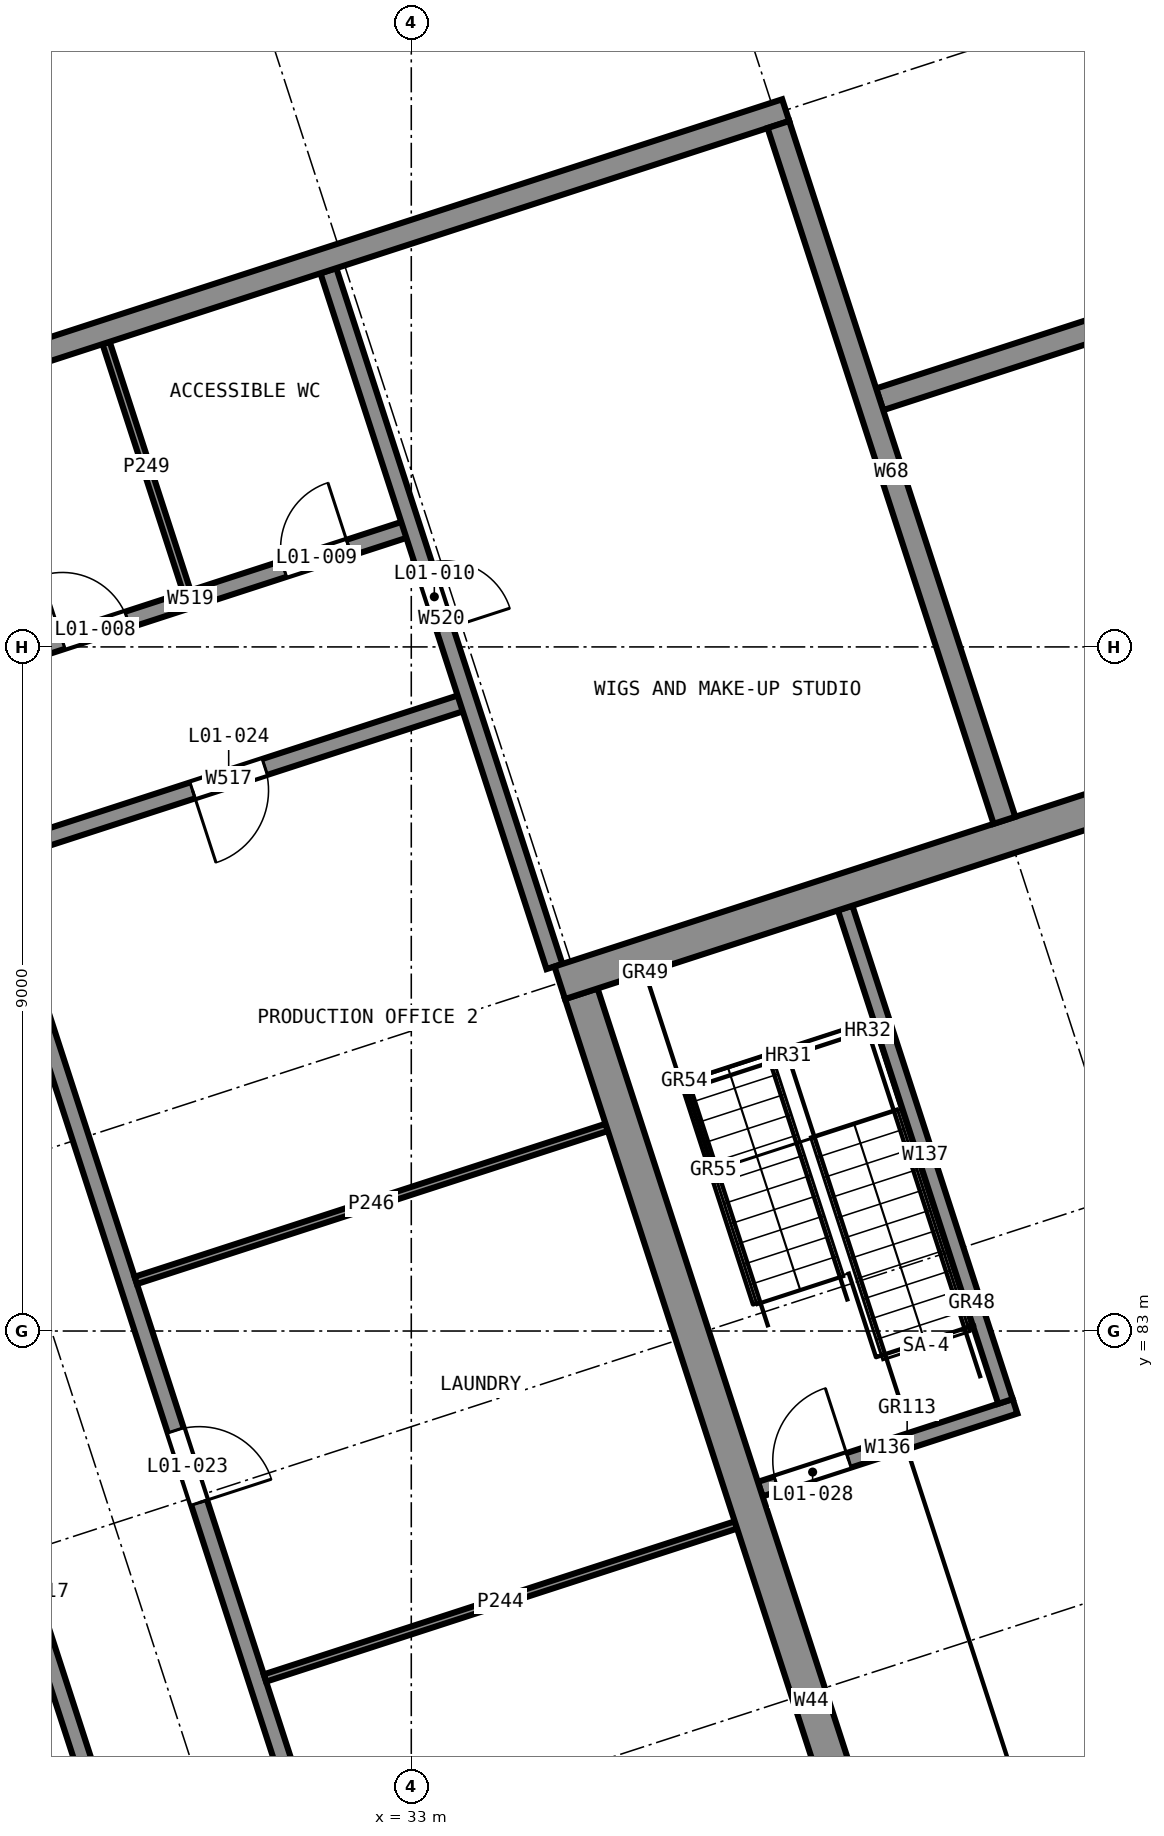
"""IFC4 building model, lengths in metres.
Left out: names, types, materials, properties, quantities, classifications, styles, units other than length and angle.
Written with IfcOpenShell. Run it as: python <this file> out.ifc"""

import sys

from ifc_helpers import new_model, si_unit, direction, frame, frame_2d, origin, place, context, subcontext, project, spatial, rectangle, extrude, element, fill, save


model = new_model("IFC4")
c1 = context("Model", 3, precision=1e-05, world=origin(), true_north=direction((0.0, 1.0)))
c2 = subcontext(c1, "Body", "Model", "MODEL_VIEW")
j1 = project(units=[si_unit("LENGTHUNIT", "METRE"), si_unit("PLANEANGLEUNIT", "RADIAN")], contexts=[c1])
p1 = place(None, origin())
s1 = spatial("IfcSite", under=j1, at=p1, CompositionType="ELEMENT")
p2 = place(p1, origin())
s2 = spatial("IfcBuilding", under=s1, at=p2, CompositionType="ELEMENT")
p3 = place(p2, frame((0.0, 0.0, 5.5)))
s3 = spatial("IfcBuildingStorey", under=s2, at=p3, CompositionType="ELEMENT", Elevation=5.5)
p4 = place(p3, frame((41.286, 68.82, 0.0), z_axis=(0.0, 0.0, 1.0), x_axis=(-0.309008517326, 0.951059270613, 0.0)))
e1 = element("IfcWall", 1, at=p4, inside=s3, PredefinedType="SHEAR", context=c2, shape_type="SweptSolid", body=[
    extrude(rectangle(XDim=19.575, YDim=0.45, at=frame_2d((9.788, 0.0))), origin(), (0.0, 0.0, 1.0), 4.0),
])
p5 = place(p3, frame((34.953, 87.581, 0.0), z_axis=(0.0, 0.0, 1.0), x_axis=(0.951059165148, 0.309008841924, 0.0)))
e2 = element("IfcWall", 2, at=p5, inside=s3, PredefinedType="SHEAR", context=c2, shape_type="SweptSolid", body=[
    extrude(rectangle(XDim=29.45, YDim=0.45, at=frame_2d((14.725, 0.0))), origin(), (0.0, 0.0, 1.0), 4.0),
])
p6 = place(p3, frame((33.501, 41.003, 0.0), z_axis=(0.0, 0.0, 1.0), x_axis=(-0.309017194826, 0.951056451165, 0.0)))
e3 = element("IfcWall", 3, at=p6, inside=s3, PredefinedType="SOLIDWALL", context=c2, shape_type="SweptSolid", body=[
    extrude(rectangle(XDim=53.7, YDim=0.3, at=frame_2d((26.85, 0.0))), origin(), (0.0, 0.0, 1.0), 4.0),
])
p7 = place(p6, frame((26.55, 0.0, 0.9)))
e4 = element("IfcOpeningElement", 4, at=p7, cuts=e3, PredefinedType="OPENING", context=c2, shape_type="SweptSolid", body=[
    extrude(rectangle(XDim=3.6, YDim=2.1, at=frame_2d((1.8, 1.05))), frame((0.0, 0.16, 0.0), z_axis=(0.0, -1.0, 0.0), x_axis=(1.0, 0.0, 0.0)), (0.0, 0.0, 1.0), 0.32),
])
p8 = place(p3, frame((16.718, 92.171, 0.0), z_axis=(0.0, 0.0, 1.0), x_axis=(0.951055789165, 0.309019232243, 0.0)))
e5 = element("IfcWall", 5, at=p8, inside=s3, PredefinedType="SOLIDWALL", context=c2, shape_type="SweptSolid", body=[
    extrude(rectangle(XDim=22.3, YDim=0.3, at=frame_2d((11.15, 0.0))), origin(), (0.0, 0.0, 1.0), 4.0),
])
p9 = place(p3, frame((37.83, 98.873, 0.0), z_axis=(0.0, 0.0, 1.0), x_axis=(0.30902011435, -0.951055502548, 0.0)))
e6 = element("IfcWall", 6, at=p9, inside=s3, PredefinedType="SOLIDWALL", context=c2, shape_type="SweptSolid", body=[
    extrude(rectangle(XDim=9.625, YDim=0.3, at=frame_2d((4.812, 0.0))), origin(), (0.0, 0.0, 1.0), 4.0),
])
p10 = place(p3, frame((39.162, 95.258, 0.0), z_axis=(0.0, 0.0, 1.0), x_axis=(0.951058550479, 0.309010733732, 0.0)))
e7 = element("IfcWall", 7, at=p10, inside=s3, PredefinedType="SOLIDWALL", context=c2, shape_type="SweptSolid", body=[
    extrude(rectangle(XDim=17.0, YDim=0.3, at=frame_2d((8.5, 0.0))), origin(), (0.0, 0.0, 1.0), 4.0),
])
p11 = place(p3, frame((37.591, 80.92, 0.0), z_axis=(0.0, 0.0, 1.0), x_axis=(0.951052389726, 0.30902969436, 0.0)))
e8 = element("IfcWall", 8, at=p11, inside=s3, PredefinedType="SOLIDWALL", context=c2, shape_type="SweptSolid", body=[
    extrude(rectangle(XDim=3.525, YDim=0.2, at=frame_2d((1.763, 0.0))), origin(), (0.0, 0.0, 1.0), 4.0),
])
p12 = place(p11, frame((0.225, 0.0, 0.0)))
e9 = element("IfcOpeningElement", 9, at=p12, cuts=e8, PredefinedType="OPENING", context=c2, shape_type="SweptSolid", body=[
    extrude(rectangle(XDim=1.0, YDim=2.1, at=frame_2d((0.5, 1.05))), frame((0.0, 0.11, 0.0), z_axis=(0.0, -1.0, 0.0), x_axis=(1.0, 0.0, 0.0)), (0.0, 0.0, 1.0), 0.22),
])
p13 = place(p3, frame((40.817, 82.074, 0.0), z_axis=(0.0, 0.0, 1.0), x_axis=(-0.309028643499, 0.951052731186, 0.0)))
e10 = element("IfcWall", 10, at=p13, inside=s3, PredefinedType="SOLIDWALL", context=c2, shape_type="SweptSolid", body=[
    extrude(rectangle(XDim=6.825, YDim=0.2, at=frame_2d((3.413, 0.0))), origin(), (0.0, 0.0, 1.0), 4.0),
])
p14 = place(p3, frame((37.956, 48.812, 0.0), z_axis=(0.0, 0.0, 1.0), x_axis=(-0.30901736393, 0.951056396219, 0.0)))
e11 = element("IfcWall", 11, at=p14, inside=s3, PredefinedType="SOLIDWALL", context=c2, shape_type="SweptSolid", body=[
    extrude(rectangle(XDim=41.7, YDim=0.22, at=frame_2d((20.85, 0.0))), origin(), (0.0, 0.0, 1.0), 3.7),
])
p15 = place(p14, frame((2.009, 0.0, 0.0)))
e12 = element("IfcOpeningElement", 12, at=p15, cuts=e11, PredefinedType="OPENING", context=c2, shape_type="SweptSolid", body=[
    extrude(rectangle(XDim=1.0, YDim=2.1, at=frame_2d((0.5, 1.05))), frame((0.0, 0.12, 0.0), z_axis=(0.0, -1.0, 0.0), x_axis=(1.0, 0.0, 0.0)), (0.0, 0.0, 1.0), 0.24),
])
p16 = place(p14, frame((6.6, 0.0, 0.0)))
e13 = element("IfcOpeningElement", 13, at=p16, cuts=e11, PredefinedType="OPENING", context=c2, shape_type="SweptSolid", body=[
    extrude(rectangle(XDim=1.2, YDim=2.1, at=frame_2d((0.6, 1.05))), frame((0.0, 0.12, 0.0), z_axis=(0.0, -1.0, 0.0), x_axis=(1.0, 0.0, 0.0)), (0.0, 0.0, 1.0), 0.24),
])
p17 = place(p14, frame((11.7, 0.0, 0.0)))
e14 = element("IfcOpeningElement", 14, at=p17, cuts=e11, PredefinedType="OPENING", context=c2, shape_type="SweptSolid", body=[
    extrude(rectangle(XDim=1.2, YDim=2.1, at=frame_2d((0.6, 1.05))), frame((0.0, 0.12, 0.0), z_axis=(0.0, -1.0, 0.0), x_axis=(1.0, 0.0, 0.0)), (0.0, 0.0, 1.0), 0.24),
])
p18 = place(p14, frame((16.7, 0.0, 0.0)))
e15 = element("IfcOpeningElement", 15, at=p18, cuts=e11, PredefinedType="OPENING", context=c2, shape_type="SweptSolid", body=[
    extrude(rectangle(XDim=1.2, YDim=2.1, at=frame_2d((0.6, 1.05))), frame((0.0, 0.12, 0.0), z_axis=(0.0, -1.0, 0.0), x_axis=(1.0, 0.0, 0.0)), (0.0, 0.0, 1.0), 0.24),
])
p19 = place(p14, frame((21.7, 0.0, 0.0)))
e16 = element("IfcOpeningElement", 16, at=p19, cuts=e11, PredefinedType="OPENING", context=c2, shape_type="SweptSolid", body=[
    extrude(rectangle(XDim=1.2, YDim=2.1, at=frame_2d((0.6, 1.05))), frame((0.0, 0.12, 0.0), z_axis=(0.0, -1.0, 0.0), x_axis=(1.0, 0.0, 0.0)), (0.0, 0.0, 1.0), 0.24),
])
p20 = place(p14, frame((26.7, 0.0, 0.0)))
e17 = element("IfcOpeningElement", 17, at=p20, cuts=e11, PredefinedType="OPENING", context=c2, shape_type="SweptSolid", body=[
    extrude(rectangle(XDim=1.2, YDim=2.1, at=frame_2d((0.6, 1.05))), frame((0.0, 0.12, 0.0), z_axis=(0.0, -1.0, 0.0), x_axis=(1.0, 0.0, 0.0)), (0.0, 0.0, 1.0), 0.24),
])
p21 = place(p14, frame((31.739, 0.0, 0.0)))
e18 = element("IfcOpeningElement", 18, at=p21, cuts=e11, PredefinedType="OPENING", context=c2, shape_type="SweptSolid", body=[
    extrude(rectangle(XDim=1.2, YDim=2.1, at=frame_2d((0.6, 1.05))), frame((0.0, 0.12, 0.0), z_axis=(0.0, -1.0, 0.0), x_axis=(1.0, 0.0, 0.0)), (0.0, 0.0, 1.0), 0.24),
])
p22 = place(p3, frame((40.333, 49.584, 0.0), z_axis=(0.0, 0.0, 1.0), x_axis=(-0.309015643281, 0.951056955291, 0.0)))
e19 = element("IfcWall", 19, at=p22, inside=s3, PredefinedType="SOLIDWALL", context=c2, shape_type="SweptSolid", body=[
    extrude(rectangle(XDim=41.7, YDim=0.22, at=frame_2d((20.85, 0.0))), origin(), (0.0, 0.0, 1.0), 3.7),
])
p23 = place(p22, frame((1.9, 0.0, 0.0)))
e20 = element("IfcOpeningElement", 20, at=p23, cuts=e19, PredefinedType="OPENING", context=c2, shape_type="SweptSolid", body=[
    extrude(rectangle(XDim=1.2, YDim=2.1, at=frame_2d((0.6, 1.05))), frame((0.0, 0.12, 0.0), z_axis=(0.0, -1.0, 0.0), x_axis=(1.0, 0.0, 0.0)), (0.0, 0.0, 1.0), 0.24),
])
p24 = place(p22, frame((8.285, 0.0, 0.0)))
e21 = element("IfcOpeningElement", 21, at=p24, cuts=e19, PredefinedType="OPENING", context=c2, shape_type="SweptSolid", body=[
    extrude(rectangle(XDim=1.0, YDim=2.1, at=frame_2d((0.5, 1.05))), frame((0.0, 0.12, 0.0), z_axis=(0.0, -1.0, 0.0), x_axis=(1.0, 0.0, 0.0)), (0.0, 0.0, 1.0), 0.24),
])
p25 = place(p22, frame((16.375, 0.0, 0.0)))
e22 = element("IfcOpeningElement", 22, at=p25, cuts=e19, PredefinedType="OPENING", context=c2, shape_type="SweptSolid", body=[
    extrude(rectangle(XDim=1.2, YDim=2.1, at=frame_2d((0.6, 1.05))), frame((0.0, 0.12, 0.0), z_axis=(0.0, -1.0, 0.0), x_axis=(1.0, 0.0, 0.0)), (0.0, 0.0, 1.0), 0.24),
])
p26 = place(p22, frame((25.752, 0.0, 0.0)))
e23 = element("IfcOpeningElement", 23, at=p26, cuts=e19, PredefinedType="OPENING", context=c2, shape_type="SweptSolid", body=[
    extrude(rectangle(XDim=1.0, YDim=2.1, at=frame_2d((0.5, 1.05))), frame((0.0, 0.12, 0.0), z_axis=(0.0, -1.0, 0.0), x_axis=(1.0, 0.0, 0.0)), (0.0, 0.0, 1.0), 0.24),
])
p27 = place(p22, frame((32.761, 0.0, 0.0)))
e24 = element("IfcOpeningElement", 24, at=p27, cuts=e19, PredefinedType="OPENING", context=c2, shape_type="SweptSolid", body=[
    extrude(rectangle(XDim=1.0, YDim=2.1, at=frame_2d((0.5, 1.05))), frame((0.0, 0.12, 0.0), z_axis=(0.0, -1.0, 0.0), x_axis=(1.0, 0.0, 0.0)), (0.0, 0.0, 1.0), 0.24),
])
p28 = place(p3, frame((27.447, 89.243, 0.0), z_axis=(0.0, 0.0, 1.0), x_axis=(0.951062229373, 0.308999410776, 0.0)))
e25 = element("IfcWall", 25, at=p28, inside=s3, PredefinedType="SOLIDWALL", context=c2, shape_type="SweptSolid", body=[
    extrude(rectangle(XDim=6.625, YDim=0.22, at=frame_2d((3.312, 0.0))), origin(), (0.0, 0.0, 1.0), 3.7),
])
p29 = place(p28, frame((2.812, 0.0, 0.0)))
e26 = element("IfcOpeningElement", 26, at=p29, cuts=e25, PredefinedType="OPENING", context=c2, shape_type="SweptSolid", body=[
    extrude(rectangle(XDim=1.0, YDim=2.1, at=frame_2d((0.5, 1.05))), frame((0.0, 0.12, 0.0), z_axis=(0.0, -1.0, 0.0), x_axis=(1.0, 0.0, 0.0)), (0.0, 0.0, 1.0), 0.24),
])
p30 = place(p3, frame((27.181, 91.68, 0.0), z_axis=(0.0, 0.0, 1.0), x_axis=(0.951063356831, 0.308995940577, 0.0)))
e27 = element("IfcWall", 27, at=p30, inside=s3, PredefinedType="SOLIDWALL", context=c2, shape_type="SweptSolid", body=[
    extrude(rectangle(XDim=6.125, YDim=0.22, at=frame_2d((3.062, 0.0))), origin(), (0.0, 0.0, 1.0), 3.7),
])
p31 = place(p30, frame((1.293, 0.0, 0.0)))
e28 = element("IfcOpeningElement", 28, at=p31, cuts=e27, PredefinedType="OPENING", context=c2, shape_type="SweptSolid", body=[
    extrude(rectangle(XDim=0.9, YDim=2.1, at=frame_2d((0.45, 1.05))), frame((0.0, 0.12, 0.0), z_axis=(0.0, -1.0, 0.0), x_axis=(1.0, 0.0, 0.0)), (0.0, 0.0, 1.0), 0.24),
])
p32 = place(p30, frame((4.357, 0.0, 0.0)))
e29 = element("IfcOpeningElement", 29, at=p32, cuts=e27, PredefinedType="OPENING", context=c2, shape_type="SweptSolid", body=[
    extrude(rectangle(XDim=0.9, YDim=2.1, at=frame_2d((0.45, 1.05))), frame((0.0, 0.12, 0.0), z_axis=(0.0, -1.0, 0.0), x_axis=(1.0, 0.0, 0.0)), (0.0, 0.0, 1.0), 0.24),
])
p33 = place(p3, frame((34.884, 87.795, 0.0), z_axis=(0.0, 0.0, 1.0), x_axis=(-0.309027569133, 0.951053080283, 0.0)))
e30 = element("IfcWall", 30, at=p33, inside=s3, PredefinedType="SOLIDWALL", context=c2, shape_type="SweptSolid", body=[
    extrude(rectangle(XDim=9.625, YDim=0.22, at=frame_2d((4.812, 0.0))), origin(), (0.0, 0.0, 1.0), 3.7),
])
p34 = place(p33, frame((4.665, 0.0, 0.0)))
e31 = element("IfcOpeningElement", 31, at=p34, cuts=e30, PredefinedType="OPENING", context=c2, shape_type="SweptSolid", body=[
    extrude(rectangle(XDim=0.9, YDim=2.1, at=frame_2d((0.45, 1.05))), frame((0.0, 0.12, 0.0), z_axis=(0.0, -1.0, 0.0), x_axis=(1.0, 0.0, 0.0)), (0.0, 0.0, 1.0), 0.24),
])
p35 = place(p3, frame((31.075, 78.435, 0.0), z_axis=(0.0, 0.0, 1.0), x_axis=(0.951058024796, 0.309012351648, 0.0)))
e32 = element("IfcWall", 32, at=p35, inside=s3, PredefinedType="PARTITIONING", context=c2, shape_type="SweptSolid", body=[
    extrude(rectangle(XDim=6.515, YDim=0.1, at=frame_2d((3.257, 0.0))), origin(), (0.0, 0.0, 1.0), 3.7),
])
p36 = place(p3, frame((29.375, 83.666, 0.0), z_axis=(0.0, 0.0, 1.0), x_axis=(0.951061602966, 0.309001338773, 0.0)))
e33 = element("IfcWall", 33, at=p36, inside=s3, PredefinedType="PARTITIONING", context=c2, shape_type="SweptSolid", body=[
    extrude(rectangle(XDim=6.515, YDim=0.1, at=frame_2d((3.258, 0.0))), origin(), (0.0, 0.0, 1.0), 3.7),
])
p37 = place(p3, frame((30.048, 92.727, 0.0), z_axis=(0.0, 0.0, 1.0), x_axis=(-0.309021877853, 0.951054929543, 0.0)))
e34 = element("IfcWall", 34, at=p37, inside=s3, PredefinedType="PARTITIONING", context=c2, shape_type="SweptSolid", body=[
    extrude(rectangle(XDim=3.44, YDim=0.1, at=frame_2d((1.72, 0.0))), origin(), (0.0, 0.0, 1.0), 3.7),
])
p38 = place(p31, origin())
e35 = element("IfcDoor", 35, at=p38, inside=s3, OperationType="SINGLE_SWING_RIGHT", PredefinedType="DOOR", context=c2, shape_type="SweptSolid", body=[
    extrude(rectangle(XDim=0.9, YDim=2.1, at=frame_2d((0.45, 1.05))), frame((0.0, 0.025, 0.0), z_axis=(0.0, -1.0, 0.0), x_axis=(1.0, 0.0, 0.0)), (0.0, 0.0, 1.0), 0.05),
])
fill(e28, e35)
p39 = place(p32, origin())
e36 = element("IfcDoor", 36, at=p39, inside=s3, OperationType="SINGLE_SWING_LEFT", PredefinedType="DOOR", context=c2, shape_type="SweptSolid", body=[
    extrude(rectangle(XDim=0.9, YDim=2.1, at=frame_2d((0.45, 1.05))), frame((0.0, 0.025, 0.0), z_axis=(0.0, -1.0, 0.0), x_axis=(1.0, 0.0, 0.0)), (0.0, 0.0, 1.0), 0.05),
])
fill(e29, e36)
p40 = place(p34, frame((0.9, 0.0, 0.0), z_axis=(0.0, 0.0, 1.0), x_axis=(-1.0, 0.0, 0.0)))
e37 = element("IfcDoor", 37, at=p40, inside=s3, OperationType="SINGLE_SWING_LEFT", PredefinedType="DOOR", context=c2, shape_type="SweptSolid", body=[
    extrude(rectangle(XDim=0.9, YDim=2.1, at=frame_2d((0.45, 1.05))), frame((0.0, 0.025, 0.0), z_axis=(0.0, -1.0, 0.0), x_axis=(1.0, 0.0, 0.0)), (0.0, 0.0, 1.0), 0.05),
])
fill(e31, e37)
p41 = place(p27, frame((1.0, 0.0, 0.0), z_axis=(0.0, 0.0, 1.0), x_axis=(-1.0, 0.0, 0.0)))
e38 = element("IfcDoor", 38, at=p41, inside=s3, OperationType="SINGLE_SWING_LEFT", PredefinedType="DOOR", context=c2, shape_type="SweptSolid", body=[
    extrude(rectangle(XDim=1.0, YDim=2.1, at=frame_2d((0.5, 1.05))), frame((0.0, 0.025, 0.0), z_axis=(0.0, -1.0, 0.0), x_axis=(1.0, 0.0, 0.0)), (0.0, 0.0, 1.0), 0.05),
])
fill(e24, e38)
p42 = place(p29, frame((1.0, 0.0, 0.0), z_axis=(0.0, 0.0, 1.0), x_axis=(-1.0, 0.0, 0.0)))
e39 = element("IfcDoor", 39, at=p42, inside=s3, OperationType="SINGLE_SWING_LEFT", PredefinedType="DOOR", context=c2, shape_type="SweptSolid", body=[
    extrude(rectangle(XDim=1.0, YDim=2.1, at=frame_2d((0.5, 1.05))), frame((0.0, 0.025, 0.0), z_axis=(0.0, -1.0, 0.0), x_axis=(1.0, 0.0, 0.0)), (0.0, 0.0, 1.0), 0.05),
])
fill(e26, e39)
p43 = place(p12, origin())
e40 = element("IfcDoor", 40, at=p43, inside=s3, OperationType="SINGLE_SWING_LEFT", PredefinedType="DOOR", context=c2, shape_type="SweptSolid", body=[
    extrude(rectangle(XDim=1.0, YDim=2.1, at=frame_2d((0.5, 1.05))), frame((0.0, 0.025, 0.0), z_axis=(0.0, -1.0, 0.0), x_axis=(1.0, 0.0, 0.0)), (0.0, 0.0, 1.0), 0.05),
])
fill(e9, e40)
save(model, sys.argv[1])
